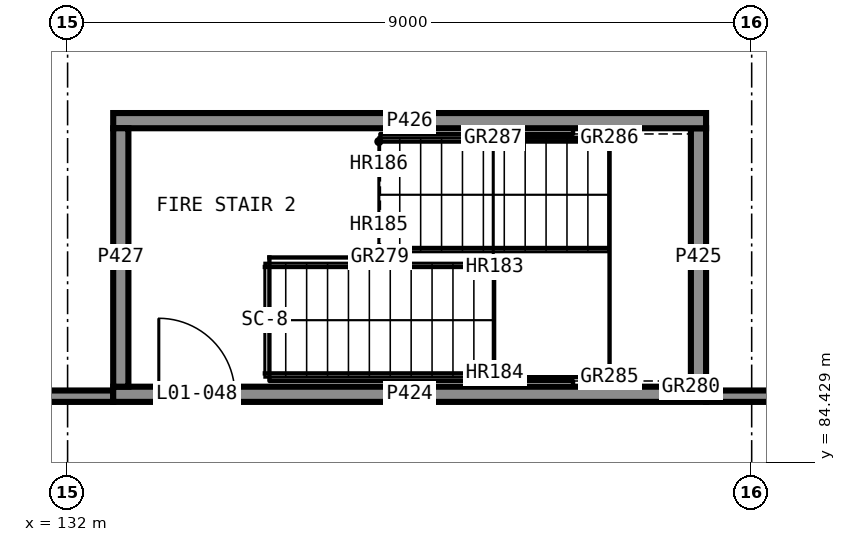
"""IFC4 building model, lengths in metres.
Left out: names, types, materials, properties, quantities, classifications, styles, units other than length and angle.
Written with IfcOpenShell. Run it as: python <this file> out.ifc"""

import sys

from ifc_helpers import new_model, si_unit, direction, frame, frame_2d, origin, place, context, subcontext, project, spatial, rectangle, extrude, element, fill, save


model = new_model("IFC4")
c1 = context("Model", 3, precision=1e-05, world=origin(), true_north=direction((0.0, 1.0)))
c2 = subcontext(c1, "Body", "Model", "MODEL_VIEW")
j1 = project(units=[si_unit("LENGTHUNIT", "METRE"), si_unit("PLANEANGLEUNIT", "RADIAN")], contexts=[c1])
p1 = place(None, origin())
s1 = spatial("IfcSite", under=j1, at=p1, CompositionType="ELEMENT")
p2 = place(p1, origin())
s2 = spatial("IfcBuilding", under=s1, at=p2, CompositionType="ELEMENT")
p3 = place(p2, frame((0.0, 0.0, 5.5)))
s3 = spatial("IfcBuildingStorey", under=s2, at=p3, CompositionType="ELEMENT", Elevation=5.5)
p4 = place(p3, frame((132.6, 85.325, 0.0), z_axis=(0.0, 0.0, 1.0), x_axis=(1.0, 0.0, 0.0)))
e1 = element("IfcWall", 1, at=p4, inside=s3, PredefinedType="SHEAR", context=c2, shape_type="SweptSolid", body=[
    extrude(rectangle(XDim=7.8, YDim=0.2, at=frame_2d((3.9, 0.0))), origin(), (0.0, 0.0, 1.0), 3.75),
])
p5 = place(p4, frame((0.6, 0.0, 0.0)))
e2 = element("IfcOpeningElement", 2, at=p5, cuts=e1, PredefinedType="OPENING", context=c2, shape_type="SweptSolid", body=[
    extrude(rectangle(XDim=1.0, YDim=2.1, at=frame_2d((0.5, 1.05))), frame((0.0, 0.11, 0.0), z_axis=(0.0, -1.0, 0.0), x_axis=(1.0, 0.0, 0.0)), (0.0, 0.0, 1.0), 0.22),
])
p6 = place(p3, frame((140.3, 85.425, 0.0), z_axis=(0.0, 0.0, 1.0), x_axis=(0.0, 1.0, 0.0)))
e3 = element("IfcWall", 3, at=p6, inside=s3, PredefinedType="SHEAR", context=c2, shape_type="SweptSolid", body=[
    extrude(rectangle(XDim=3.4, YDim=0.2, at=frame_2d((1.7, 0.0))), origin(), (0.0, 0.0, 1.0), 3.75),
])
p7 = place(p3, frame((140.4, 88.925, 0.0), z_axis=(0.0, 0.0, 1.0), x_axis=(-1.0, 0.0, 0.0)))
e4 = element("IfcWall", 4, at=p7, inside=s3, PredefinedType="SHEAR", context=c2, shape_type="SweptSolid", body=[
    extrude(rectangle(XDim=7.8, YDim=0.2, at=frame_2d((3.9, 0.0))), origin(), (0.0, 0.0, 1.0), 3.75),
])
p8 = place(p3, frame((132.7, 88.825, 0.0), z_axis=(0.0, 0.0, 1.0), x_axis=(0.0, -1.0, 0.0)))
e5 = element("IfcWall", 5, at=p8, inside=s3, PredefinedType="SHEAR", context=c2, shape_type="SweptSolid", body=[
    extrude(rectangle(XDim=3.4, YDim=0.2, at=frame_2d((1.7, 0.0))), origin(), (0.0, 0.0, 1.0), 3.75),
])
p9 = place(p3, frame((122.7, 85.3, 0.0), z_axis=(0.0, 0.0, 1.0), x_axis=(1.0, 0.0, 0.0)))
e6 = element("IfcWall", 6, at=p9, inside=s3, PredefinedType="PARTITIONING", context=c2, shape_type="SweptSolid", body=[
    extrude(rectangle(XDim=9.9, YDim=0.15, at=frame_2d((4.95, 0.0))), origin(), (0.0, 0.0, 1.0), 3.75),
])
p10 = place(p3, frame((140.4, 85.3, 0.0), z_axis=(0.0, 0.0, 1.0), x_axis=(1.0, 0.0, 0.0)))
e7 = element("IfcWall", 7, at=p10, inside=s3, PredefinedType="PARTITIONING", context=c2, shape_type="SweptSolid", body=[
    extrude(rectangle(XDim=2.825, YDim=0.15, at=frame_2d((1.413, 0.0))), origin(), (0.0, 0.0, 1.0), 3.75),
])
p11 = place(p5, origin())
e8 = element("IfcDoor", 8, at=p11, inside=s3, OperationType="SINGLE_SWING_RIGHT", PredefinedType="DOOR", context=c2, shape_type="SweptSolid", body=[
    extrude(rectangle(XDim=1.0, YDim=2.1, at=frame_2d((0.5, 1.05))), frame((0.0, 0.025, 0.0), z_axis=(0.0, -1.0, 0.0), x_axis=(1.0, 0.0, 0.0)), (0.0, 0.0, 1.0), 0.05),
])
fill(e2, e8)
save(model, sys.argv[1])
